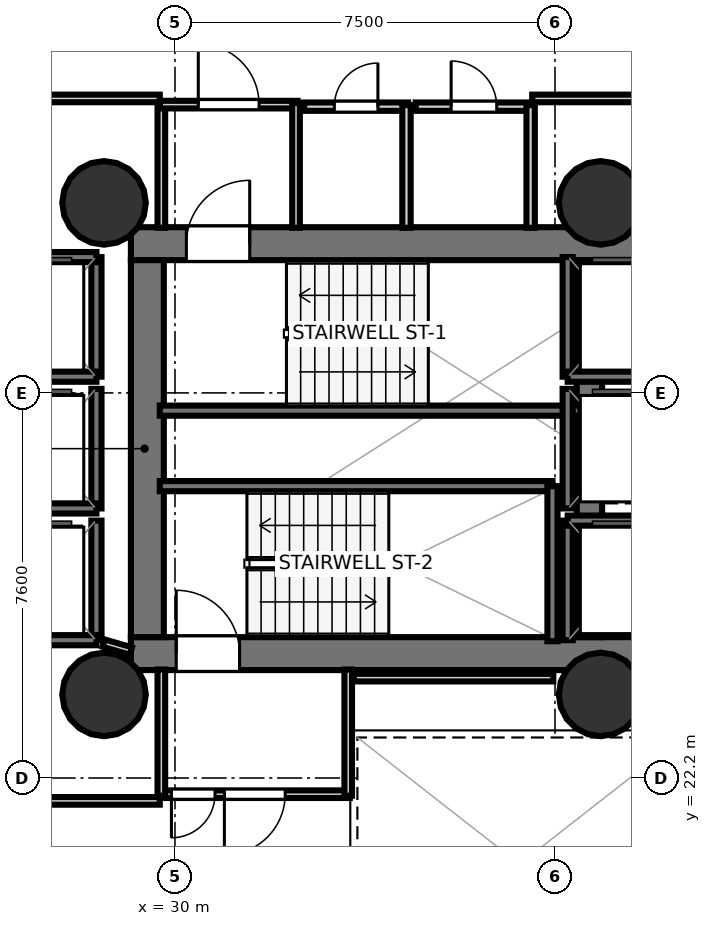
"""IFC4 building model, lengths in metres.
Left out: names, types, materials, properties, quantities, classifications, styles, units other than length and angle.
Written with IfcOpenShell. Run it as: python <this file> out.ifc"""

import sys

from ifc_helpers import new_model, si_unit, direction, frame, frame_2d, origin, origin_2d, place, context, subcontext, project, spatial, rectangle, hollow_circle, extrude, element, fill, save


model = new_model("IFC4")
c1 = context("Model", 3, precision=1e-05, world=origin(), true_north=direction((0.0, 1.0)))
c2 = subcontext(c1, "Body", "Model", "MODEL_VIEW")
j1 = project(units=[si_unit("LENGTHUNIT", "METRE"), si_unit("PLANEANGLEUNIT", "RADIAN")], contexts=[c1])
p1 = place(None, origin())
s1 = spatial("IfcSite", under=j1, at=p1, CompositionType="ELEMENT")
p2 = place(p1, origin())
s2 = spatial("IfcBuilding", under=s1, at=p2, CompositionType="ELEMENT")
p3 = place(p2, frame((0.0, 0.0, 71.0)))
s3 = spatial("IfcBuildingStorey", under=s2, at=p3, CompositionType="ELEMENT", Elevation=71.0)
p4 = place(p3, frame((29.13, 32.745, 0.0), z_axis=(0.0, 0.0, 1.0), x_axis=(1.0, 0.0, 0.0)))
e1 = element("IfcWall", 1, at=p4, inside=s3, PredefinedType="SHEAR", context=c2, shape_type="SweptSolid", body=[
    extrude(rectangle(XDim=10.72, YDim=0.65, at=frame_2d((5.36, 0.0))), origin(), (0.0, 0.0, 1.0), 3.52),
])
p5 = place(p4, frame((1.095, 0.0, 0.0)))
e2 = element("IfcOpeningElement", 2, at=p5, cuts=e1, PredefinedType="OPENING", context=c2, shape_type="SweptSolid", body=[
    extrude(rectangle(XDim=1.25, YDim=2.15, at=frame_2d((0.625, 1.075))), frame((0.0, 0.335, 0.0), z_axis=(0.0, -1.0, 0.0), x_axis=(1.0, 0.0, 0.0)), (0.0, 0.0, 1.0), 0.67),
])
p6 = place(p3, frame((29.13, 24.655, 0.0), z_axis=(0.0, 0.0, 1.0), x_axis=(1.0, 0.0, 0.0)))
e3 = element("IfcWall", 3, at=p6, inside=s3, PredefinedType="SHEAR", context=c2, shape_type="SweptSolid", body=[
    extrude(rectangle(XDim=10.72, YDim=0.65, at=frame_2d((5.36, 0.0))), origin(), (0.0, 0.0, 1.0), 3.52),
])
p7 = place(p6, frame((0.895, 0.0, 0.0)))
e4 = element("IfcOpeningElement", 4, at=p7, cuts=e3, PredefinedType="OPENING", context=c2, shape_type="SweptSolid", body=[
    extrude(rectangle(XDim=1.25, YDim=2.15, at=frame_2d((0.625, 1.075))), frame((0.0, 0.335, 0.0), z_axis=(0.0, -1.0, 0.0), x_axis=(1.0, 0.0, 0.0)), (0.0, 0.0, 1.0), 0.67),
])
p8 = place(p3, frame((29.455, 24.98, 0.0), z_axis=(0.0, 0.0, 1.0), x_axis=(0.0, 1.0, 0.0)))
e5 = element("IfcWall", 5, at=p8, inside=s3, PredefinedType="SHEAR", context=c2, shape_type="SweptSolid", body=[
    extrude(rectangle(XDim=7.44, YDim=0.65, at=frame_2d((3.72, 0.0))), origin(), (0.0, 0.0, 1.0), 3.52),
])
p9 = place(p3, frame((38.18, 24.98, 0.0), z_axis=(0.0, 0.0, 1.0), x_axis=(0.0, 1.0, 0.0)))
e6 = element("IfcWall", 6, at=p9, inside=s3, PredefinedType="SHEAR", context=c2, shape_type="SweptSolid", body=[
    extrude(rectangle(XDim=7.44, YDim=0.5, at=frame_2d((3.72, 0.0))), origin(), (0.0, 0.0, 1.0), 3.52),
])
for number, where, z_axis, x_axis in (
    (7, (28.6, 33.55, 0.0), (0.0, 0.0, 1.0), (1.0, 0.0, 0.0)),
    (8, (28.6, 23.85, 0.0), (0.0, 0.0, 1.0), (1.0, 0.0, 0.0)),
    (9, (38.4, 33.55, 0.0), (0.0, 0.0, 1.0), (1.0, 0.0, 0.0)),
    (10, (38.4, 23.85, 0.0), (0.0, 0.0, 1.0), (1.0, 0.0, 0.0)),
):
    element("IfcColumn", number, at=place(p3, frame(where, z_axis=z_axis, x_axis=x_axis)), inside=s3, PredefinedType="COLUMN", context=c2, shape_type="SweptSolid", body=[
        extrude(hollow_circle(Radius=0.825, WallThickness=0.04, at=origin_2d()), origin(), (0.0, 0.0, 1.0), 3.7),
    ])
p10 = place(p3, frame((29.7, 29.45, 0.0), z_axis=(0.0, 0.0, 1.0), x_axis=(1.0, 0.0, 0.0)))
e11 = element("IfcWall", 11, at=p10, inside=s3, PredefinedType="SOLIDWALL", context=c2, shape_type="SweptSolid", body=[
    extrude(rectangle(XDim=8.3, YDim=0.2, at=frame_2d((4.15, 0.0))), origin(), (0.0, 0.0, 1.0), 3.52),
])
p11 = place(p3, frame((29.7, 27.96, 0.0), z_axis=(0.0, 0.0, 1.0), x_axis=(1.0, 0.0, 0.0)))
e12 = element("IfcWall", 12, at=p11, inside=s3, PredefinedType="SOLIDWALL", context=c2, shape_type="SweptSolid", body=[
    extrude(rectangle(XDim=7.75, YDim=0.2, at=frame_2d((3.875, 0.0))), origin(), (0.0, 0.0, 1.0), 3.52),
])
p12 = place(p3, frame((37.45, 24.9, 0.0), z_axis=(0.0, 0.0, 1.0), x_axis=(0.0, 1.0, 0.0)))
e13 = element("IfcWall", 13, at=p12, inside=s3, PredefinedType="SOLIDWALL", context=c2, shape_type="SweptSolid", body=[
    extrude(rectangle(XDim=3.06, YDim=0.2, at=frame_2d((1.53, 0.0))), origin(), (0.0, 0.0, 1.0), 3.52),
])
p13 = place(p3, frame((37.75, 30.12, 0.0), z_axis=(0.0, 0.0, 1.0), x_axis=(0.0, 1.0, 0.0)))
e14 = element("IfcWall", 14, at=p13, inside=s3, PredefinedType="SOLIDWALL", context=c2, shape_type="SweptSolid", body=[
    extrude(rectangle(XDim=2.36, YDim=0.2, at=frame_2d((1.18, 0.0))), origin(), (0.0, 0.0, 1.0), 3.52),
])
p14 = place(p3, frame((37.75, 30.12, 0.0), z_axis=(0.0, 0.0, 1.0), x_axis=(1.0, 0.0, 0.0)))
e15 = element("IfcWall", 15, at=p14, inside=s3, PredefinedType="SOLIDWALL", context=c2, shape_type="SweptSolid", body=[
    extrude(rectangle(XDim=2.1, YDim=0.2, at=frame_2d((1.05, 0.0))), origin(), (0.0, 0.0, 1.0), 3.52),
])
p15 = place(p3, frame((37.75, 24.92, 0.0), z_axis=(0.0, 0.0, 1.0), x_axis=(0.0, 1.0, 0.0)))
e16 = element("IfcWall", 16, at=p15, inside=s3, PredefinedType="SOLIDWALL", context=c2, shape_type="SweptSolid", body=[
    extrude(rectangle(XDim=2.36, YDim=0.2, at=frame_2d((1.18, 0.0))), origin(), (0.0, 0.0, 1.0), 3.52),
])
p16 = place(p3, frame((37.75, 27.28, 0.0), z_axis=(0.0, 0.0, 1.0), x_axis=(1.0, 0.0, 0.0)))
e17 = element("IfcWall", 17, at=p16, inside=s3, PredefinedType="SOLIDWALL", context=c2, shape_type="SweptSolid", body=[
    extrude(rectangle(XDim=2.1, YDim=0.2, at=frame_2d((1.05, 0.0))), origin(), (0.0, 0.0, 1.0), 3.52),
])
p17 = place(p3, frame((28.45, 30.12, 0.0), z_axis=(0.0, 0.0, 1.0), x_axis=(0.0, 1.0, 0.0)))
e18 = element("IfcWall", 18, at=p17, inside=s3, PredefinedType="SOLIDWALL", context=c2, shape_type="SweptSolid", body=[
    extrude(rectangle(XDim=2.36, YDim=0.2, at=frame_2d((1.18, 0.0))), origin(), (0.0, 0.0, 1.0), 3.52),
])
for number, where, z_axis, x_axis in (
    (19, (26.35, 32.48, 0.0), (0.0, 0.0, 1.0), (1.0, 0.0, 0.0)),
    (20, (26.35, 30.12, 0.0), (0.0, 0.0, 1.0), (1.0, 0.0, 0.0)),
):
    element("IfcWall", number, at=place(p3, frame(where, z_axis=z_axis, x_axis=x_axis)), inside=s3, PredefinedType="SOLIDWALL", context=c2, shape_type="SweptSolid", body=[
        extrude(rectangle(XDim=2.1, YDim=0.2, at=frame_2d((1.05, 0.0))), origin(), (0.0, 0.0, 1.0), 3.52),
    ])
p18 = place(p3, frame((28.45, 27.52, 0.0), z_axis=(0.0, 0.0, 1.0), x_axis=(0.0, 1.0, 0.0)))
e21 = element("IfcWall", 21, at=p18, inside=s3, PredefinedType="SOLIDWALL", context=c2, shape_type="SweptSolid", body=[
    extrude(rectangle(XDim=2.36, YDim=0.2, at=frame_2d((1.18, 0.0))), origin(), (0.0, 0.0, 1.0), 3.52),
])
p19 = place(p3, frame((26.35, 27.52, 0.0), z_axis=(0.0, 0.0, 1.0), x_axis=(1.0, 0.0, 0.0)))
e22 = element("IfcWall", 22, at=p19, inside=s3, PredefinedType="SOLIDWALL", context=c2, shape_type="SweptSolid", body=[
    extrude(rectangle(XDim=2.1, YDim=0.2, at=frame_2d((1.05, 0.0))), origin(), (0.0, 0.0, 1.0), 3.52),
])
p20 = place(p3, frame((28.45, 24.92, 0.0), z_axis=(0.0, 0.0, 1.0), x_axis=(0.0, 1.0, 0.0)))
e23 = element("IfcWall", 23, at=p20, inside=s3, PredefinedType="SOLIDWALL", context=c2, shape_type="SweptSolid", body=[
    extrude(rectangle(XDim=2.36, YDim=0.2, at=frame_2d((1.18, 0.0))), origin(), (0.0, 0.0, 1.0), 3.52),
])
p21 = place(p3, frame((26.35, 24.92, 0.0), z_axis=(0.0, 0.0, 1.0), x_axis=(1.0, 0.0, 0.0)))
e24 = element("IfcWall", 24, at=p21, inside=s3, PredefinedType="SOLIDWALL", context=c2, shape_type="SweptSolid", body=[
    extrude(rectangle(XDim=2.1, YDim=0.2, at=frame_2d((1.05, 0.0))), origin(), (0.0, 0.0, 1.0), 3.52),
])
p22 = place(p3, frame((37.75, 27.52, 0.0), z_axis=(0.0, 0.0, 1.0), x_axis=(0.0, 1.0, 0.0)))
e25 = element("IfcWall", 25, at=p22, inside=s3, PredefinedType="SOLIDWALL", context=c2, shape_type="SweptSolid", body=[
    extrude(rectangle(XDim=2.36, YDim=0.2, at=frame_2d((1.18, 0.0))), origin(), (0.0, 0.0, 1.0), 3.52),
])
p23 = place(p3, frame((29.731, 33.058, 0.0), z_axis=(0.0, 0.0, 1.0), x_axis=(0.0, 1.0, 0.0)))
e26 = element("IfcWall", 26, at=p23, inside=s3, PredefinedType="PARTITIONING", context=c2, shape_type="SweptSolid", body=[
    extrude(rectangle(XDim=2.462, YDim=0.15, at=frame_2d((1.231, 0.0))), origin(), (0.0, 0.0, 1.0), 2.84),
])
p24 = place(p3, frame((29.7, 35.489, 0.0), z_axis=(0.0, 0.0, 1.0), x_axis=(1.0, 0.0, 0.0)))
e27 = element("IfcWall", 27, at=p24, inside=s3, PredefinedType="PARTITIONING", context=c2, shape_type="SweptSolid", body=[
    extrude(rectangle(XDim=2.72, YDim=0.15, at=frame_2d((1.36, 0.0))), origin(), (0.0, 0.0, 1.0), 2.84),
])
p25 = place(p24, frame((0.76, 0.0, 0.0)))
e28 = element("IfcOpeningElement", 28, at=p25, cuts=e27, PredefinedType="OPENING", context=c2, shape_type="SweptSolid", body=[
    extrude(rectangle(XDim=1.2, YDim=2.15, at=frame_2d((0.6, 1.075))), frame((0.0, 0.085, 0.0), z_axis=(0.0, -1.0, 0.0), x_axis=(1.0, 0.0, 0.0)), (0.0, 0.0, 1.0), 0.17),
])
p26 = place(p3, frame((32.389, 35.52, 0.0), z_axis=(0.0, 0.0, 1.0), x_axis=(0.0, -1.0, 0.0)))
e29 = element("IfcWall", 29, at=p26, inside=s3, PredefinedType="PARTITIONING", context=c2, shape_type="SweptSolid", body=[
    extrude(rectangle(XDim=2.462, YDim=0.15, at=frame_2d((1.231, 0.0))), origin(), (0.0, 0.0, 1.0), 2.84),
])
p27 = place(p3, frame((33.45, 21.881, 0.0), z_axis=(0.0, 0.0, 1.0), x_axis=(-1.0, 0.0, 0.0)))
e30 = element("IfcWall", 30, at=p27, inside=s3, PredefinedType="PARTITIONING", context=c2, shape_type="SweptSolid", body=[
    extrude(rectangle(XDim=3.75, YDim=0.15, at=frame_2d((1.875, 0.0))), origin(), (0.0, 0.0, 1.0), 2.84),
])
p28 = place(p27, frame((1.275, 0.0, 0.0)))
e31 = element("IfcOpeningElement", 31, at=p28, cuts=e30, PredefinedType="OPENING", context=c2, shape_type="SweptSolid", body=[
    extrude(rectangle(XDim=1.2, YDim=2.15, at=frame_2d((0.6, 1.075))), frame((0.0, 0.085, 0.0), z_axis=(0.0, -1.0, 0.0), x_axis=(1.0, 0.0, 0.0)), (0.0, 0.0, 1.0), 0.17),
])
p29 = place(p27, frame((2.66, 0.0, 0.0)))
e32 = element("IfcOpeningElement", 32, at=p29, cuts=e30, PredefinedType="OPENING", context=c2, shape_type="SweptSolid", body=[
    extrude(rectangle(XDim=0.86, YDim=2.05, at=frame_2d((0.43, 1.025))), frame((0.0, 0.085, 0.0), z_axis=(0.0, -1.0, 0.0), x_axis=(1.0, 0.0, 0.0)), (0.0, 0.0, 1.0), 0.17),
])
for number, where, z_axis, x_axis in (
    (33, (29.731, 21.85, 0.0), (0.0, 0.0, 1.0), (0.0, 1.0, 0.0)),
    (34, (33.419, 24.342, 0.0), (0.0, 0.0, 1.0), (0.0, -1.0, 0.0)),
):
    element("IfcWall", number, at=place(p3, frame(where, z_axis=z_axis, x_axis=x_axis)), inside=s3, PredefinedType="PARTITIONING", context=c2, shape_type="SweptSolid", body=[
        extrude(rectangle(XDim=2.492, YDim=0.15, at=frame_2d((1.246, 0.0))), origin(), (0.0, 0.0, 1.0), 2.84),
    ])
p30 = place(p3, frame((32.55, 35.449, 0.0), z_axis=(0.0, 0.0, 1.0), x_axis=(1.0, 0.0, 0.0)))
e35 = element("IfcWall", 35, at=p30, inside=s3, PredefinedType="PLUMBINGWALL", context=c2, shape_type="SweptSolid", body=[
    extrude(rectangle(XDim=2.05, YDim=0.165, at=frame_2d((1.025, 0.0))), origin(), (0.0, 0.0, 1.0), 2.84),
])
p31 = place(p30, frame((0.595, 0.0, 0.0)))
e36 = element("IfcOpeningElement", 36, at=p31, cuts=e35, PredefinedType="OPENING", context=c2, shape_type="SweptSolid", body=[
    extrude(rectangle(XDim=0.86, YDim=2.05, at=frame_2d((0.43, 1.025))), frame((0.0, 0.093, 0.0), z_axis=(0.0, -1.0, 0.0), x_axis=(1.0, 0.0, 0.0)), (0.0, 0.0, 1.0), 0.185),
])
p32 = place(p3, frame((34.569, 35.48, 0.0), z_axis=(0.0, 0.0, 1.0), x_axis=(0.0, -1.0, 0.0)))
e37 = element("IfcWall", 37, at=p32, inside=s3, PredefinedType="PLUMBINGWALL", context=c2, shape_type="SweptSolid", body=[
    extrude(rectangle(XDim=2.422, YDim=0.165, at=frame_2d((1.211, 0.0))), origin(), (0.0, 0.0, 1.0), 2.84),
])
p33 = place(p3, frame((34.75, 35.449, 0.0), z_axis=(0.0, 0.0, 1.0), x_axis=(1.0, 0.0, 0.0)))
e38 = element("IfcWall", 38, at=p33, inside=s3, PredefinedType="PLUMBINGWALL", context=c2, shape_type="SweptSolid", body=[
    extrude(rectangle(XDim=2.3, YDim=0.165, at=frame_2d((1.15, 0.0))), origin(), (0.0, 0.0, 1.0), 2.84),
])
p34 = place(p33, frame((0.7, 0.0, 0.0)))
e39 = element("IfcOpeningElement", 39, at=p34, cuts=e38, PredefinedType="OPENING", context=c2, shape_type="SweptSolid", body=[
    extrude(rectangle(XDim=0.9, YDim=2.1, at=frame_2d((0.45, 1.05))), frame((0.0, 0.093, 0.0), z_axis=(0.0, -1.0, 0.0), x_axis=(1.0, 0.0, 0.0)), (0.0, 0.0, 1.0), 0.185),
])
p35 = place(p3, frame((37.019, 35.48, 0.0), z_axis=(0.0, 0.0, 1.0), x_axis=(0.0, -1.0, 0.0)))
e40 = element("IfcWall", 40, at=p35, inside=s3, PredefinedType="PLUMBINGWALL", context=c2, shape_type="SweptSolid", body=[
    extrude(rectangle(XDim=2.422, YDim=0.165, at=frame_2d((1.211, 0.0))), origin(), (0.0, 0.0, 1.0), 2.84),
])
p36 = place(p3, frame((29.13, 24.706, 0.0), z_axis=(0.0, 0.0, 1.0), x_axis=(-0.960451214223, 0.278448316742, 0.0)))
e41 = element("IfcWall", 41, at=p36, inside=s3, PredefinedType="PARTITIONING", context=c2, shape_type="SweptSolid", body=[
    extrude(rectangle(XDim=0.562, YDim=0.15, at=frame_2d((0.281, 0.0))), origin(), (0.0, 0.0, 1.0), 2.84),
])
p37 = place(p3, frame((37.467, 24.181, 0.0), z_axis=(0.0, 0.0, 1.0), x_axis=(-1.0, 0.0, 0.0)))
e42 = element("IfcWall", 42, at=p37, inside=s3, PredefinedType="PARTITIONING", context=c2, shape_type="SweptSolid", body=[
    extrude(rectangle(XDim=3.937, YDim=0.15, at=frame_2d((1.968, 0.0))), origin(), (0.0, 0.0, 1.0), 2.84),
])
p38 = place(p3, frame((39.818, 35.611, 0.0), z_axis=(0.0, 0.0, 1.0), x_axis=(-1.0, 0.0, 0.0)))
e43 = element("IfcWall", 43, at=p38, inside=s3, PredefinedType="PARTITIONING", context=c2, shape_type="SweptSolid", body=[
    extrude(rectangle(XDim=2.768, YDim=0.15, at=frame_2d((1.384, 0.0))), origin(), (0.0, 0.0, 1.0), 2.84),
])
p39 = place(p3, frame((29.7, 35.611, 0.0), z_axis=(0.0, 0.0, 1.0), x_axis=(-1.0, 0.0, 0.0)))
e44 = element("IfcWall", 44, at=p39, inside=s3, PredefinedType="PARTITIONING", context=c2, shape_type="SweptSolid", body=[
    extrude(rectangle(XDim=3.28, YDim=0.15, at=frame_2d((1.64, 0.0))), origin(), (0.0, 0.0, 1.0), 2.798),
])
p40 = place(p3, frame((26.42, 21.749, 0.0), z_axis=(0.0, 0.0, 1.0), x_axis=(1.0, 0.0, 0.0)))
e45 = element("IfcWall", 45, at=p40, inside=s3, PredefinedType="PARTITIONING", context=c2, shape_type="SweptSolid", body=[
    extrude(rectangle(XDim=3.28, YDim=0.15, at=frame_2d((1.64, 0.0))), origin(), (0.0, 0.0, 1.0), 2.84),
])
p41 = place(p3, frame((38.33, 42.093, 0.0), z_axis=(0.0, 0.0, 1.0), x_axis=(0.745568655549, -0.666428825804, 0.0)))
e46 = element("IfcWall", 46, at=p41, inside=s3, PredefinedType="PARTITIONING", context=c2, shape_type="SweptSolid", body=[
    extrude(rectangle(XDim=8.678, YDim=0.14, at=frame_2d((4.339, 0.0))), origin(), (0.0, 0.0, 1.0), 2.84),
])
p42 = place(p5, origin())
e47 = element("IfcDoor", 47, at=p42, inside=s3, OperationType="SINGLE_SWING_RIGHT", PredefinedType="DOOR", context=c2, shape_type="SweptSolid", body=[
    extrude(rectangle(XDim=1.25, YDim=2.15, at=frame_2d((0.625, 1.075))), frame((0.0, 0.025, 0.0), z_axis=(0.0, -1.0, 0.0), x_axis=(1.0, 0.0, 0.0)), (0.0, 0.0, 1.0), 0.05),
])
fill(e2, e47)
p43 = place(p7, origin())
e48 = element("IfcDoor", 48, at=p43, inside=s3, OperationType="SINGLE_SWING_LEFT", PredefinedType="DOOR", context=c2, shape_type="SweptSolid", body=[
    extrude(rectangle(XDim=1.25, YDim=2.15, at=frame_2d((0.625, 1.075))), frame((0.0, 0.025, 0.0), z_axis=(0.0, -1.0, 0.0), x_axis=(1.0, 0.0, 0.0)), (0.0, 0.0, 1.0), 0.05),
])
fill(e4, e48)
p44 = place(p25, origin())
e49 = element("IfcDoor", 49, at=p44, inside=s3, OperationType="SINGLE_SWING_LEFT", PredefinedType="DOOR", context=c2, shape_type="SweptSolid", body=[
    extrude(rectangle(XDim=1.2, YDim=2.15, at=frame_2d((0.6, 1.075))), frame((0.0, 0.025, 0.0), z_axis=(0.0, -1.0, 0.0), x_axis=(1.0, 0.0, 0.0)), (0.0, 0.0, 1.0), 0.05),
])
fill(e28, e49)
p45 = place(p28, origin())
e50 = element("IfcDoor", 50, at=p45, inside=s3, OperationType="SINGLE_SWING_RIGHT", PredefinedType="DOOR", context=c2, shape_type="SweptSolid", body=[
    extrude(rectangle(XDim=1.2, YDim=2.15, at=frame_2d((0.6, 1.075))), frame((0.0, 0.025, 0.0), z_axis=(0.0, -1.0, 0.0), x_axis=(1.0, 0.0, 0.0)), (0.0, 0.0, 1.0), 0.05),
])
fill(e31, e50)
p46 = place(p31, origin())
e51 = element("IfcDoor", 51, at=p46, inside=s3, OperationType="SINGLE_SWING_RIGHT", PredefinedType="DOOR", context=c2, shape_type="SweptSolid", body=[
    extrude(rectangle(XDim=0.86, YDim=2.05, at=frame_2d((0.43, 1.025))), frame((0.0, 0.025, 0.0), z_axis=(0.0, -1.0, 0.0), x_axis=(1.0, 0.0, 0.0)), (0.0, 0.0, 1.0), 0.05),
])
fill(e36, e51)
p47 = place(p34, origin())
e52 = element("IfcDoor", 52, at=p47, inside=s3, OperationType="SINGLE_SWING_LEFT", PredefinedType="DOOR", context=c2, shape_type="SweptSolid", body=[
    extrude(rectangle(XDim=0.9, YDim=2.1, at=frame_2d((0.45, 1.05))), frame((0.0, 0.025, 0.0), z_axis=(0.0, -1.0, 0.0), x_axis=(1.0, 0.0, 0.0)), (0.0, 0.0, 1.0), 0.05),
])
fill(e39, e52)
p48 = place(p29, origin())
e53 = element("IfcDoor", 53, at=p48, inside=s3, OperationType="SINGLE_SWING_RIGHT", PredefinedType="DOOR", context=c2, shape_type="SweptSolid", body=[
    extrude(rectangle(XDim=0.86, YDim=2.05, at=frame_2d((0.43, 1.025))), frame((0.0, 0.025, 0.0), z_axis=(0.0, -1.0, 0.0), x_axis=(1.0, 0.0, 0.0)), (0.0, 0.0, 1.0), 0.05),
])
fill(e32, e53)
save(model, sys.argv[1])
